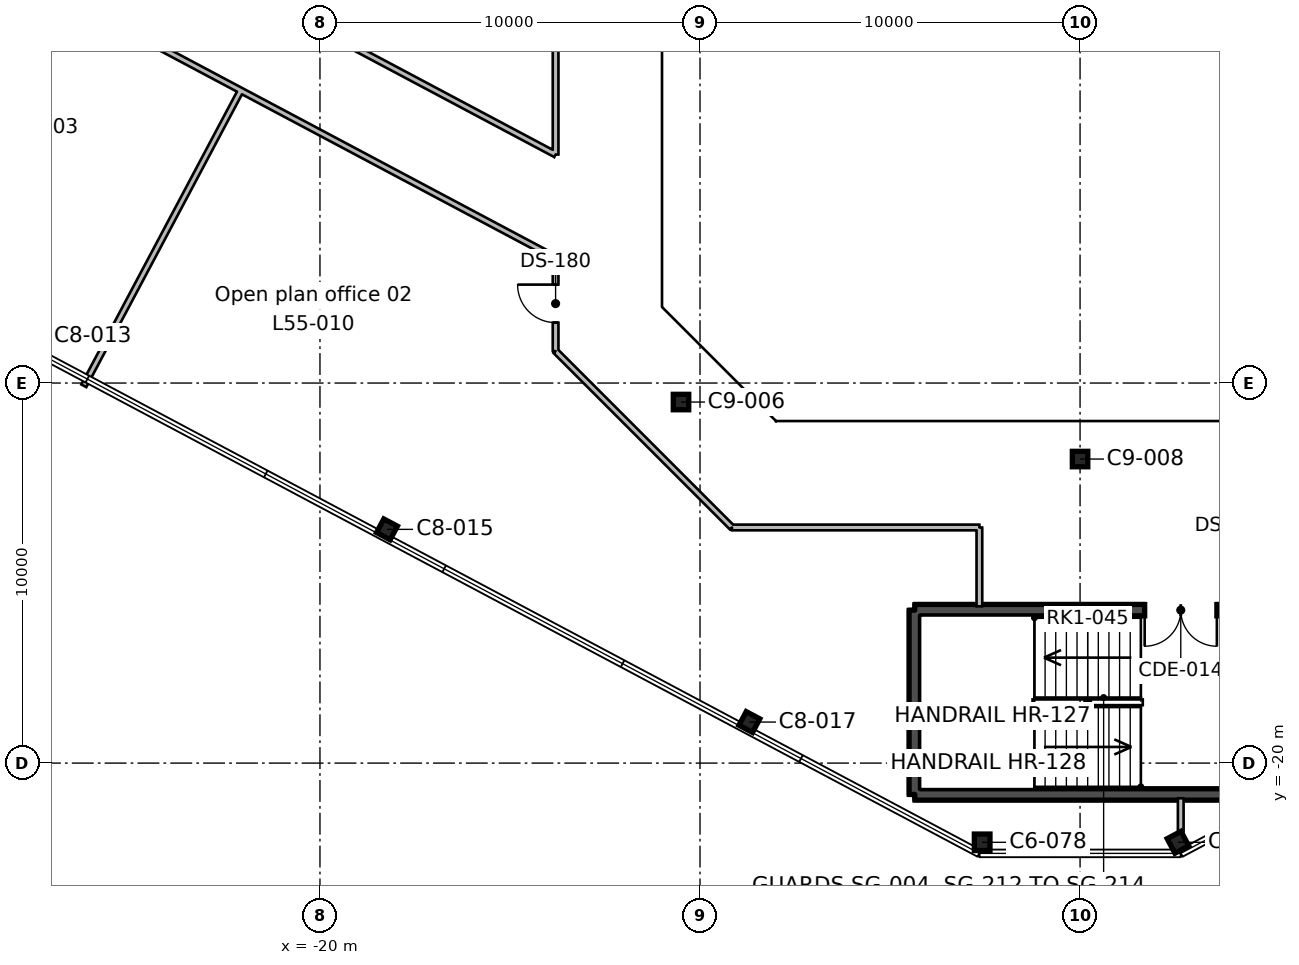
"""IFC4 building model, lengths in metres.
Left out: names, types, materials, properties, quantities, classifications, styles, units other than length and angle.
Written with IfcOpenShell. Run it as: python <this file> out.ifc"""

import sys

from ifc_helpers import new_model, si_unit, direction, frame, frame_2d, origin, origin_2d, place, context, subcontext, project, spatial, rectangle, hollow_rectangle, i_section, extrude, element, fill, save


model = new_model("IFC4")
c1 = context("Model", 3, precision=1e-05, world=origin(), true_north=direction((0.0, 1.0)))
c2 = subcontext(c1, "Body", "Model", "MODEL_VIEW")
j1 = project(units=[si_unit("LENGTHUNIT", "METRE"), si_unit("PLANEANGLEUNIT", "RADIAN")], contexts=[c1])
p1 = place(None, origin())
s1 = spatial("IfcSite", under=j1, at=p1, CompositionType="ELEMENT")
p2 = place(p1, origin())
s2 = spatial("IfcBuilding", under=s1, at=p2, CompositionType="ELEMENT")
p3 = place(p2, frame((0.0, 0.0, 248.1)))
s3 = spatial("IfcBuildingStorey", under=s2, at=p3, CompositionType="ELEMENT", Elevation=248.1)
for number, where, z_axis, x_axis in (
    (1, (-2.576, -22.084, 0.0), (0.0, 0.0, 1.0), (1.0, 0.0, 0.0)),
    (2, (2.576, -22.084, 0.0), (0.0, 0.0, 1.0), (0.883, 0.469, 0.0)),
):
    element("IfcColumn", number, at=place(p3, frame(where, z_axis=z_axis, x_axis=x_axis)), inside=s3, PredefinedType="COLUMN", context=c2, shape_type="SweptSolid", body=[
        extrude(i_section(OverallWidth=0.412, OverallDepth=0.434, WebThickness=0.036, FlangeThickness=0.057, FilletRadius=0.015, at=origin_2d()), origin(), (0.0, 0.0, 1.0), 3.9),
    ])
for number, where, z_axis, x_axis in (
    (3, (-8.701, -18.92, 0.0), (0.0, 0.0, 1.0), (0.883, -0.469, 0.0)),
    (4, (-18.237, -13.85, 0.0), (0.0, 0.0, 1.0), (0.883, -0.469, 0.0)),
):
    element("IfcColumn", number, at=place(p3, frame(where, z_axis=z_axis, x_axis=x_axis)), inside=s3, PredefinedType="COLUMN", context=c2, shape_type="SweptSolid", body=[
        extrude(i_section(OverallWidth=0.404, OverallDepth=0.406, WebThickness=0.027, FlangeThickness=0.044, FilletRadius=0.015, at=origin_2d()), origin(), (0.0, 0.0, 1.0), 3.9),
    ])
for number, where, z_axis, x_axis in (
    (5, (0.0, -12.0, 0.0), (0.0, 0.0, 1.0), (1.0, 0.0, 0.0)),
    (6, (-10.5, -10.5, 0.0), (0.0, 0.0, 1.0), (1.0, 0.0, 0.0)),
):
    element("IfcColumn", number, at=place(p3, frame(where, z_axis=z_axis, x_axis=x_axis)), inside=s3, PredefinedType="COLUMN", context=c2, shape_type="SweptSolid", body=[
        extrude(hollow_rectangle(XDim=0.406, YDim=0.406, WallThickness=0.015, InnerFilletRadius=0.007, OuterFilletRadius=0.022, at=origin_2d()), origin(), (0.0, 0.0, 1.0), 3.9),
    ])
p4 = place(p3, frame((3.95, -20.825, 0.0), z_axis=(0.0, 0.0, 1.0), x_axis=(-1.0, 0.0, 0.0)))
e7 = element("IfcWall", 7, at=p4, inside=s3, PredefinedType="SHEAR", context=c2, shape_type="SweptSolid", body=[
    extrude(rectangle(XDim=8.3, YDim=0.3, at=frame_2d((4.15, 0.0))), origin(), (0.0, 0.0, 1.0), 3.9),
])
p5 = place(p3, frame((-4.35, -20.825, 0.0), z_axis=(0.0, 0.0, 1.0), x_axis=(0.0, 1.0, 0.0)))
e8 = element("IfcWall", 8, at=p5, inside=s3, PredefinedType="SHEAR", context=c2, shape_type="SweptSolid", body=[
    extrude(rectangle(XDim=4.85, YDim=0.3, at=frame_2d((2.425, 0.0))), origin(), (0.0, 0.0, 1.0), 3.9),
])
p6 = place(p3, frame((-4.35, -15.975, 0.0), z_axis=(0.0, 0.0, 1.0), x_axis=(1.0, 0.0, 0.0)))
e9 = element("IfcWall", 9, at=p6, inside=s3, PredefinedType="SHEAR", context=c2, shape_type="SweptSolid", body=[
    extrude(rectangle(XDim=8.3, YDim=0.3, at=frame_2d((4.15, 0.0))), origin(), (0.0, 0.0, 1.0), 3.9),
])
p7 = place(p6, frame((6.05, 0.0, 0.0)))
e10 = element("IfcOpeningElement", 10, at=p7, cuts=e9, PredefinedType="OPENING", context=c2, shape_type="SweptSolid", body=[
    extrude(rectangle(XDim=1.9, YDim=2.1, at=frame_2d((0.95, 1.05))), frame((0.0, 0.16, 0.0), z_axis=(0.0, -1.0, 0.0), x_axis=(1.0, 0.0, 0.0)), (0.0, 0.0, 1.0), 0.32),
])
p8 = place(p3, frame((-13.8, -9.16, 0.0), z_axis=(0.0, 0.0, 1.0), x_axis=(0.0, 1.0, 0.0)))
e11 = element("IfcWall", 11, at=p8, inside=s3, PredefinedType="PARTITIONING", context=c2, shape_type="SweptSolid", body=[
    extrude(rectangle(XDim=2.454, YDim=0.15, at=frame_2d((1.227, 0.0))), origin(), (0.0, 0.0, 1.0), 3.45),
])
p9 = place(p8, frame((0.75, 0.0, 0.0)))
e12 = element("IfcOpeningElement", 12, at=p9, cuts=e11, PredefinedType="OPENING", context=c2, shape_type="SweptSolid", body=[
    extrude(rectangle(XDim=1.0, YDim=2.1, at=frame_2d((0.5, 1.05))), frame((0.0, 0.085, 0.0), z_axis=(0.0, -1.0, 0.0), x_axis=(1.0, 0.0, 0.0)), (0.0, 0.0, 1.0), 0.17),
])
p10 = place(p3, frame((-13.8, -6.706, 0.0), z_axis=(0.0, 0.0, 1.0), x_axis=(-0.882947286887, 0.469472138235, 0.0)))
e13 = element("IfcWall", 13, at=p10, inside=s3, PredefinedType="PARTITIONING", context=c2, shape_type="SweptSolid", body=[
    extrude(rectangle(XDim=36.571, YDim=0.15, at=frame_2d((18.285, 0.0))), origin(), (0.0, 0.0, 1.0), 3.45),
])
p11 = place(p10, frame((34.15, 0.0, 0.0)))
e14 = element("IfcOpeningElement", 14, at=p11, cuts=e13, PredefinedType="OPENING", context=c2, shape_type="SweptSolid", body=[
    extrude(rectangle(XDim=1.0, YDim=2.1, at=frame_2d((0.5, 1.05))), frame((0.0, 0.085, 0.0), z_axis=(0.0, -1.0, 0.0), x_axis=(1.0, 0.0, 0.0)), (0.0, 0.0, 1.0), 0.17),
])
p12 = place(p10, frame((20.25, 0.0, 0.0)))
e15 = element("IfcOpeningElement", 15, at=p12, cuts=e13, PredefinedType="OPENING", context=c2, shape_type="SweptSolid", body=[
    extrude(rectangle(XDim=1.0, YDim=2.1, at=frame_2d((0.5, 1.05))), frame((0.0, 0.085, 0.0), z_axis=(0.0, -1.0, 0.0), x_axis=(1.0, 0.0, 0.0)), (0.0, 0.0, 1.0), 0.17),
])
p13 = place(p10, frame((17.75, 0.0, 0.0)))
e16 = element("IfcOpeningElement", 16, at=p13, cuts=e13, PredefinedType="OPENING", context=c2, shape_type="SweptSolid", body=[
    extrude(rectangle(XDim=1.0, YDim=2.1, at=frame_2d((0.5, 1.05))), frame((0.0, 0.085, 0.0), z_axis=(0.0, -1.0, 0.0), x_axis=(1.0, 0.0, 0.0)), (0.0, 0.0, 1.0), 0.17),
])
p14 = place(p3, frame((-22.083, -2.302, 0.0), z_axis=(0.0, 0.0, 1.0), x_axis=(-0.469445946219, -0.882961212952, 0.0)))
e17 = element("IfcWall", 17, at=p14, inside=s3, PredefinedType="PARTITIONING", context=c2, shape_type="SweptSolid", body=[
    extrude(rectangle(XDim=8.8, YDim=0.15, at=frame_2d((4.4, 0.0))), origin(), (0.0, 0.0, 1.0), 3.45),
])
p15 = place(p3, frame((-13.8, -9.16, 0.0), z_axis=(0.0, 0.0, 1.0), x_axis=(0.707106781187, -0.707106781187, 0.0)))
e18 = element("IfcWall", 18, at=p15, inside=s3, PredefinedType="PARTITIONING", context=c2, shape_type="SweptSolid", body=[
    extrude(rectangle(XDim=6.562, YDim=0.15, at=frame_2d((3.281, 0.0))), origin(), (0.0, 0.0, 1.0), 3.45),
])
p16 = place(p3, frame((-2.649, -15.875, 0.0), z_axis=(0.0, 0.0, 1.0), x_axis=(0.0, 1.0, 0.0)))
e19 = element("IfcWall", 19, at=p16, inside=s3, PredefinedType="PARTITIONING", context=c2, shape_type="SweptSolid", body=[
    extrude(rectangle(XDim=2.075, YDim=0.15, at=frame_2d((1.038, 0.0))), origin(), (0.0, 0.0, 1.0), 3.45),
])
p17 = place(p3, frame((-2.649, -13.8, 0.0), z_axis=(0.0, 0.0, 1.0), x_axis=(-1.0, 0.0, 0.0)))
e20 = element("IfcWall", 20, at=p17, inside=s3, PredefinedType="PARTITIONING", context=c2, shape_type="SweptSolid", body=[
    extrude(rectangle(XDim=6.511, YDim=0.15, at=frame_2d((3.255, 0.0))), origin(), (0.0, 0.0, 1.0), 3.45),
])
p18 = place(p3, frame((2.649, -21.799, 0.0), z_axis=(0.0, 0.0, 1.0), x_axis=(0.0, 1.0, 0.0)))
e21 = element("IfcWall", 21, at=p18, inside=s3, PredefinedType="PARTITIONING", context=c2, shape_type="SweptSolid", body=[
    extrude(rectangle(XDim=0.874, YDim=0.15, at=frame_2d((0.437, 0.0))), origin(), (0.0, 0.0, 1.0), 3.45),
])
p19 = place(p3, frame((-13.8, 9.16, 0.0), z_axis=(0.0, 0.0, 1.0), x_axis=(0.0, -1.0, 0.0)))
e22 = element("IfcWall", 22, at=p19, inside=s3, PredefinedType="PARTITIONING", context=c2, shape_type="SweptSolid", body=[
    extrude(rectangle(XDim=13.148, YDim=0.15, at=frame_2d((6.574, 0.0))), origin(), (0.0, 0.0, 1.0), 3.45),
])
p20 = place(p3, frame((-13.8, -3.988, 0.0), z_axis=(0.0, 0.0, 1.0), x_axis=(-0.882949137368, 0.469468657976, 0.0)))
e23 = element("IfcWall", 23, at=p20, inside=s3, PredefinedType="PARTITIONING", context=c2, shape_type="SweptSolid", body=[
    extrude(rectangle(XDim=7.688, YDim=0.15, at=frame_2d((3.844, 0.0))), origin(), (0.0, 0.0, 1.0), 3.45),
])
p21 = place(p7, frame((1.9, 0.0, 0.0), z_axis=(0.0, 0.0, 1.0), x_axis=(-1.0, 0.0, 0.0)))
e24 = element("IfcDoor", 24, at=p21, inside=s3, OperationType="DOUBLE_DOOR_SINGLE_SWING", PredefinedType="DOOR", context=c2, shape_type="SweptSolid", body=[
    extrude(rectangle(XDim=1.9, YDim=2.1, at=frame_2d((0.95, 1.05))), frame((0.0, 0.025, 0.0), z_axis=(0.0, -1.0, 0.0), x_axis=(1.0, 0.0, 0.0)), (0.0, 0.0, 1.0), 0.05),
])
fill(e10, e24)
p22 = place(p9, origin())
e25 = element("IfcDoor", 25, at=p22, inside=s3, OperationType="SINGLE_SWING_RIGHT", PredefinedType="DOOR", context=c2, shape_type="SweptSolid", body=[
    extrude(rectangle(XDim=1.0, YDim=2.1, at=frame_2d((0.5, 1.05))), frame((0.0, 0.025, 0.0), z_axis=(0.0, -1.0, 0.0), x_axis=(1.0, 0.0, 0.0)), (0.0, 0.0, 1.0), 0.05),
])
fill(e12, e25)
save(model, sys.argv[1])
